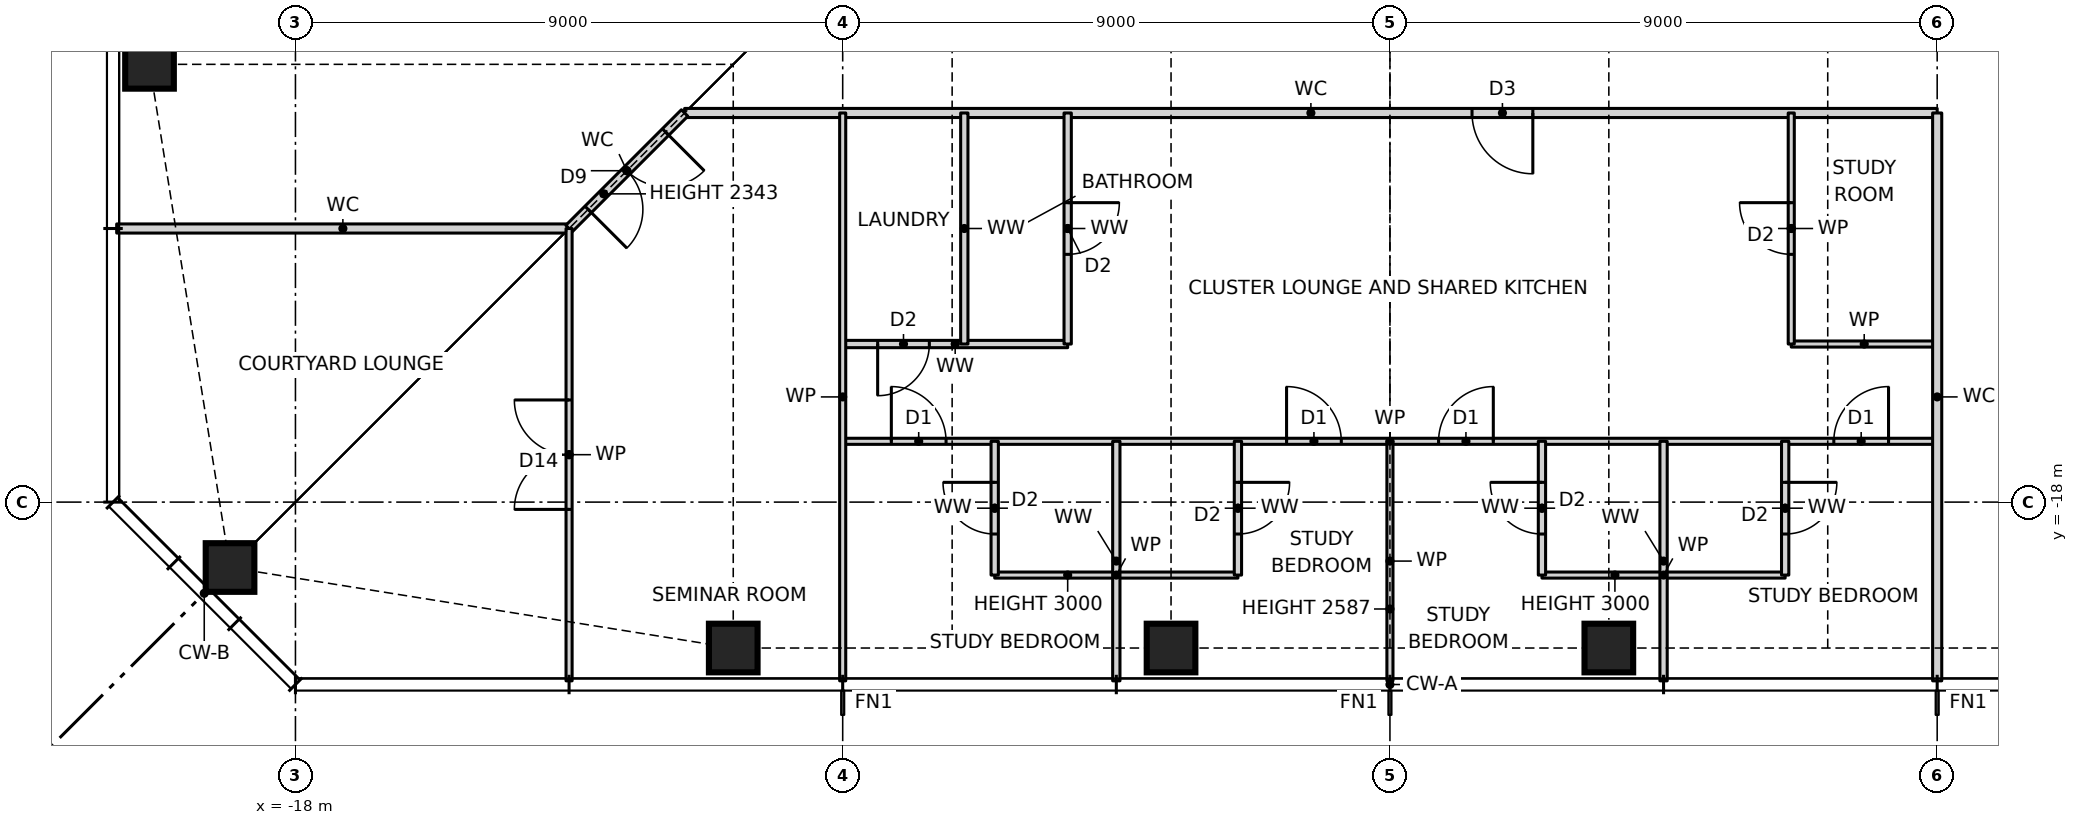
"""IFC4 building model, lengths in metres.
Left out: names, types, materials, properties, quantities, classifications, styles, units other than length and angle.
Written with IfcOpenShell. Run it as: python <this file> out.ifc"""

import sys

from ifc_helpers import new_model, si_unit, direction, frame, frame_2d, origin, origin_2d, place, context, subcontext, project, spatial, rectangle, hollow_rectangle, extrude, element, fill, save


model = new_model("IFC4")
c1 = context("Model", 3, precision=1e-05, world=origin(), true_north=direction((0.0, 1.0)))
c2 = subcontext(c1, "Body", "Model", "MODEL_VIEW")
j1 = project(units=[si_unit("LENGTHUNIT", "METRE"), si_unit("PLANEANGLEUNIT", "RADIAN")], contexts=[c1])
p1 = place(None, origin())
s1 = spatial("IfcSite", under=j1, at=p1, CompositionType="ELEMENT")
p2 = place(p1, origin())
s2 = spatial("IfcBuilding", under=s1, at=p2, CompositionType="ELEMENT")
p3 = place(p2, frame((0.0, 0.0, 101.5)))
s3 = spatial("IfcBuildingStorey", under=s2, at=p3, CompositionType="ELEMENT", Elevation=101.5)
for number, where, z_axis, x_axis in (
    (1, (-19.076, -19.076, 0.0), (0.0, 0.0, 1.0), (1.0, 0.0, 0.0)),
    (2, (-10.8, -20.4, 0.0), (0.0, 0.0, 1.0), (1.0, 0.0, 0.0)),
    (3, (-3.6, -20.4, 0.0), (0.0, 0.0, 1.0), (1.0, 0.0, 0.0)),
    (4, (3.6, -20.4, 0.0), (0.0, 0.0, 1.0), (1.0, 0.0, 0.0)),
    (5, (-20.4, -10.8, 0.0), (0.0, 0.0, 1.0), (1.0, 0.0, 0.0)),
):
    element("IfcColumn", number, at=place(p3, frame(where, z_axis=z_axis, x_axis=x_axis)), inside=s3, PredefinedType="COLUMN", context=c2, shape_type="SweptSolid", body=[
        extrude(hollow_rectangle(XDim=0.8, YDim=0.8, WallThickness=0.07, at=origin_2d()), origin(), (0.0, 0.0, 1.0), 3.5),
    ])
for number, where, z_axis, x_axis in (
    (6, (-6.5, -19.2, 0.0), (0.0, 0.0, 1.0), (1.0, 0.0, 0.0)),
    (7, (2.5, -19.2, 0.0), (0.0, 0.0, 1.0), (1.0, 0.0, 0.0)),
):
    element("IfcWall", number, at=place(p3, frame(where, z_axis=z_axis, x_axis=x_axis)), inside=s3, PredefinedType="PARTITIONING", context=c2, shape_type="SweptSolid", body=[
        extrude(rectangle(XDim=4.0, YDim=0.1, at=frame_2d((2.0, 0.0))), origin(), (0.0, 0.0, 1.0), 3.0),
    ])
p4 = place(p3, frame((-9.0, -17.0, 0.0), z_axis=(0.0, 0.0, 1.0), x_axis=(1.0, 0.0, 0.0)))
e8 = element("IfcWall", 8, at=p4, inside=s3, PredefinedType="PARTITIONING", context=c2, shape_type="SweptSolid", body=[
    extrude(rectangle(XDim=18.0, YDim=0.1, at=frame_2d((9.0, 0.0))), origin(), (0.0, 0.0, 1.0), 3.27),
])
p5 = place(p4, frame((0.8, 0.0, 0.0)))
e9 = element("IfcOpeningElement", 9, at=p5, cuts=e8, PredefinedType="OPENING", context=c2, shape_type="SweptSolid", body=[
    extrude(rectangle(XDim=0.9, YDim=2.1, at=frame_2d((0.45, 1.05))), frame((0.0, 0.06, 0.0), z_axis=(0.0, -1.0, 0.0), x_axis=(1.0, 0.0, 0.0)), (0.0, 0.0, 1.0), 0.12),
])
p6 = place(p4, frame((7.3, 0.0, 0.0)))
e10 = element("IfcOpeningElement", 10, at=p6, cuts=e8, PredefinedType="OPENING", context=c2, shape_type="SweptSolid", body=[
    extrude(rectangle(XDim=0.9, YDim=2.1, at=frame_2d((0.45, 1.05))), frame((0.0, 0.06, 0.0), z_axis=(0.0, -1.0, 0.0), x_axis=(1.0, 0.0, 0.0)), (0.0, 0.0, 1.0), 0.12),
])
p7 = place(p4, frame((9.8, 0.0, 0.0)))
e11 = element("IfcOpeningElement", 11, at=p7, cuts=e8, PredefinedType="OPENING", context=c2, shape_type="SweptSolid", body=[
    extrude(rectangle(XDim=0.9, YDim=2.1, at=frame_2d((0.45, 1.05))), frame((0.0, 0.06, 0.0), z_axis=(0.0, -1.0, 0.0), x_axis=(1.0, 0.0, 0.0)), (0.0, 0.0, 1.0), 0.12),
])
p8 = place(p4, frame((16.3, 0.0, 0.0)))
e12 = element("IfcOpeningElement", 12, at=p8, cuts=e8, PredefinedType="OPENING", context=c2, shape_type="SweptSolid", body=[
    extrude(rectangle(XDim=0.9, YDim=2.1, at=frame_2d((0.45, 1.05))), frame((0.0, 0.06, 0.0), z_axis=(0.0, -1.0, 0.0), x_axis=(1.0, 0.0, 0.0)), (0.0, 0.0, 1.0), 0.12),
])
p9 = place(p3, frame((-9.0, -15.4, 0.0), z_axis=(0.0, 0.0, 1.0), x_axis=(1.0, 0.0, 0.0)))
e13 = element("IfcWall", 13, at=p9, inside=s3, PredefinedType="PARTITIONING", context=c2, shape_type="SweptSolid", body=[
    extrude(rectangle(XDim=3.7, YDim=0.12, at=frame_2d((1.85, 0.0))), origin(), (0.0, 0.0, 1.0), 3.27),
])
p10 = place(p9, frame((0.575, 0.0, 0.0)))
e14 = element("IfcOpeningElement", 14, at=p10, cuts=e13, PredefinedType="OPENING", context=c2, shape_type="SweptSolid", body=[
    extrude(rectangle(XDim=0.85, YDim=2.1, at=frame_2d((0.425, 1.05))), frame((0.0, 0.07, 0.0), z_axis=(0.0, -1.0, 0.0), x_axis=(1.0, 0.0, 0.0)), (0.0, 0.0, 1.0), 0.14),
])
p11 = place(p3, frame((6.6, -15.4, 0.0), z_axis=(0.0, 0.0, 1.0), x_axis=(1.0, 0.0, 0.0)))
e15 = element("IfcWall", 15, at=p11, inside=s3, PredefinedType="PARTITIONING", context=c2, shape_type="SweptSolid", body=[
    extrude(rectangle(XDim=2.4, YDim=0.1, at=frame_2d((1.2, 0.0))), origin(), (0.0, 0.0, 1.0), 3.27),
])
p12 = place(p3, frame((-20.94, -13.5, 0.0), z_axis=(0.0, 0.0, 1.0), x_axis=(1.0, 0.0, 0.0)))
e16 = element("IfcWall", 16, at=p12, inside=s3, PredefinedType="PARTITIONING", context=c2, shape_type="SweptSolid", body=[
    extrude(rectangle(XDim=7.44, YDim=0.15, at=frame_2d((3.72, 0.0))), origin(), (0.0, 0.0, 1.0), 3.27),
])
p13 = place(p3, frame((-11.6, -11.6, 0.0), z_axis=(0.0, 0.0, 1.0), x_axis=(1.0, 0.0, 0.0)))
e17 = element("IfcWall", 17, at=p13, inside=s3, PredefinedType="PARTITIONING", context=c2, shape_type="SweptSolid", body=[
    extrude(rectangle(XDim=20.6, YDim=0.15, at=frame_2d((10.3, 0.0))), origin(), (0.0, 0.0, 1.0), 3.27),
])
p14 = place(p13, frame((12.95, 0.0, 0.0)))
e18 = element("IfcOpeningElement", 18, at=p14, cuts=e17, PredefinedType="OPENING", context=c2, shape_type="SweptSolid", body=[
    extrude(rectangle(XDim=1.0, YDim=2.1, at=frame_2d((0.5, 1.05))), frame((0.0, 0.085, 0.0), z_axis=(0.0, -1.0, 0.0), x_axis=(1.0, 0.0, 0.0)), (0.0, 0.0, 1.0), 0.17),
])
p15 = place(p3, frame((-13.5, -13.5, 0.0), z_axis=(0.0, 0.0, 1.0), x_axis=(0.707106781187, 0.707106781187, 0.0)))
e19 = element("IfcWall", 19, at=p15, inside=s3, PredefinedType="PARTITIONING", context=c2, shape_type="SweptSolid", body=[
    extrude(rectangle(XDim=2.687, YDim=0.15, at=frame_2d((1.343, 0.0))), origin(), (0.0, 0.0, 1.0), 2.343),
])
p16 = place(p15, frame((0.444, 0.0, 0.0)))
e20 = element("IfcOpeningElement", 20, at=p16, cuts=e19, PredefinedType="OPENING", context=c2, shape_type="SweptSolid", body=[
    extrude(rectangle(XDim=1.8, YDim=2.1, at=frame_2d((0.9, 1.05))), frame((0.0, 0.085, 0.0), z_axis=(0.0, -1.0, 0.0), x_axis=(1.0, 0.0, 0.0)), (0.0, 0.0, 1.0), 0.17),
])
p17 = place(p3, frame((9.0, -20.94, 0.0), z_axis=(0.0, 0.0, 1.0), x_axis=(0.0, 1.0, 0.0)))
e21 = element("IfcWall", 21, at=p17, inside=s3, PredefinedType="PARTITIONING", context=c2, shape_type="SweptSolid", body=[
    extrude(rectangle(XDim=9.34, YDim=0.15, at=frame_2d((4.67, 0.0))), origin(), (0.0, 0.0, 1.0), 3.27),
])
p18 = place(p3, frame((6.6, -15.4, 0.0), z_axis=(0.0, 0.0, 1.0), x_axis=(0.0, 1.0, 0.0)))
e22 = element("IfcWall", 22, at=p18, inside=s3, PredefinedType="PARTITIONING", context=c2, shape_type="SweptSolid", body=[
    extrude(rectangle(XDim=3.8, YDim=0.1, at=frame_2d((1.9, 0.0))), origin(), (0.0, 0.0, 1.0), 3.27),
])
p19 = place(p18, frame((1.475, 0.0, 0.0)))
e23 = element("IfcOpeningElement", 23, at=p19, cuts=e22, PredefinedType="OPENING", context=c2, shape_type="SweptSolid", body=[
    extrude(rectangle(XDim=0.85, YDim=2.1, at=frame_2d((0.425, 1.05))), frame((0.0, 0.06, 0.0), z_axis=(0.0, -1.0, 0.0), x_axis=(1.0, 0.0, 0.0)), (0.0, 0.0, 1.0), 0.12),
])
p20 = place(p3, frame((6.5, -19.2, 0.0), z_axis=(0.0, 0.0, 1.0), x_axis=(0.0, 1.0, 0.0)))
e24 = element("IfcWall", 24, at=p20, inside=s3, PredefinedType="PARTITIONING", context=c2, shape_type="SweptSolid", body=[
    extrude(rectangle(XDim=2.2, YDim=0.12, at=frame_2d((1.1, 0.0))), origin(), (0.0, 0.0, 1.0), 3.27),
])
p21 = place(p20, frame((0.675, 0.0, 0.0)))
e25 = element("IfcOpeningElement", 25, at=p21, cuts=e24, PredefinedType="OPENING", context=c2, shape_type="SweptSolid", body=[
    extrude(rectangle(XDim=0.85, YDim=2.1, at=frame_2d((0.425, 1.05))), frame((0.0, 0.07, 0.0), z_axis=(0.0, -1.0, 0.0), x_axis=(1.0, 0.0, 0.0)), (0.0, 0.0, 1.0), 0.14),
])
p22 = place(p3, frame((4.5, -20.94, 0.0), z_axis=(0.0, 0.0, 1.0), x_axis=(0.0, 1.0, 0.0)))
e26 = element("IfcWall", 26, at=p22, inside=s3, PredefinedType="PARTITIONING", context=c2, shape_type="SweptSolid", body=[
    extrude(rectangle(XDim=3.94, YDim=0.12, at=frame_2d((1.97, 0.0))), origin(), (0.0, 0.0, 1.0), 3.27),
])
p23 = place(p3, frame((2.5, -19.2, 0.0), z_axis=(0.0, 0.0, 1.0), x_axis=(0.0, 1.0, 0.0)))
e27 = element("IfcWall", 27, at=p23, inside=s3, PredefinedType="PARTITIONING", context=c2, shape_type="SweptSolid", body=[
    extrude(rectangle(XDim=2.2, YDim=0.12, at=frame_2d((1.1, 0.0))), origin(), (0.0, 0.0, 1.0), 3.27),
])
p24 = place(p23, frame((0.675, 0.0, 0.0)))
e28 = element("IfcOpeningElement", 28, at=p24, cuts=e27, PredefinedType="OPENING", context=c2, shape_type="SweptSolid", body=[
    extrude(rectangle(XDim=0.85, YDim=2.1, at=frame_2d((0.425, 1.05))), frame((0.0, 0.07, 0.0), z_axis=(0.0, -1.0, 0.0), x_axis=(1.0, 0.0, 0.0)), (0.0, 0.0, 1.0), 0.14),
])
p25 = place(p3, frame((0.0, -20.94, 0.0), z_axis=(0.0, 0.0, 1.0), x_axis=(0.0, 1.0, 0.0)))
e29 = element("IfcWall", 29, at=p25, inside=s3, PredefinedType="PARTITIONING", context=c2, shape_type="SweptSolid", body=[
    extrude(rectangle(XDim=3.94, YDim=0.1, at=frame_2d((1.97, 0.0))), origin(), (0.0, 0.0, 1.0), 2.587),
])
p26 = place(p3, frame((-2.5, -19.2, 0.0), z_axis=(0.0, 0.0, 1.0), x_axis=(0.0, 1.0, 0.0)))
e30 = element("IfcWall", 30, at=p26, inside=s3, PredefinedType="PARTITIONING", context=c2, shape_type="SweptSolid", body=[
    extrude(rectangle(XDim=2.2, YDim=0.12, at=frame_2d((1.1, 0.0))), origin(), (0.0, 0.0, 1.0), 3.27),
])
p27 = place(p26, frame((0.675, 0.0, 0.0)))
e31 = element("IfcOpeningElement", 31, at=p27, cuts=e30, PredefinedType="OPENING", context=c2, shape_type="SweptSolid", body=[
    extrude(rectangle(XDim=0.85, YDim=2.1, at=frame_2d((0.425, 1.05))), frame((0.0, 0.07, 0.0), z_axis=(0.0, -1.0, 0.0), x_axis=(1.0, 0.0, 0.0)), (0.0, 0.0, 1.0), 0.14),
])
p28 = place(p3, frame((-4.5, -20.94, 0.0), z_axis=(0.0, 0.0, 1.0), x_axis=(0.0, 1.0, 0.0)))
e32 = element("IfcWall", 32, at=p28, inside=s3, PredefinedType="PARTITIONING", context=c2, shape_type="SweptSolid", body=[
    extrude(rectangle(XDim=3.94, YDim=0.12, at=frame_2d((1.97, 0.0))), origin(), (0.0, 0.0, 1.0), 3.27),
])
p29 = place(p3, frame((-5.3, -15.4, 0.0), z_axis=(0.0, 0.0, 1.0), x_axis=(0.0, 1.0, 0.0)))
e33 = element("IfcWall", 33, at=p29, inside=s3, PredefinedType="PARTITIONING", context=c2, shape_type="SweptSolid", body=[
    extrude(rectangle(XDim=3.8, YDim=0.12, at=frame_2d((1.9, 0.0))), origin(), (0.0, 0.0, 1.0), 3.27),
])
p30 = place(p29, frame((1.475, 0.0, 0.0)))
e34 = element("IfcOpeningElement", 34, at=p30, cuts=e33, PredefinedType="OPENING", context=c2, shape_type="SweptSolid", body=[
    extrude(rectangle(XDim=0.85, YDim=2.1, at=frame_2d((0.425, 1.05))), frame((0.0, 0.07, 0.0), z_axis=(0.0, -1.0, 0.0), x_axis=(1.0, 0.0, 0.0)), (0.0, 0.0, 1.0), 0.14),
])
p31 = place(p3, frame((-6.5, -19.2, 0.0), z_axis=(0.0, 0.0, 1.0), x_axis=(0.0, 1.0, 0.0)))
e35 = element("IfcWall", 35, at=p31, inside=s3, PredefinedType="PARTITIONING", context=c2, shape_type="SweptSolid", body=[
    extrude(rectangle(XDim=2.2, YDim=0.12, at=frame_2d((1.1, 0.0))), origin(), (0.0, 0.0, 1.0), 3.27),
])
p32 = place(p31, frame((0.675, 0.0, 0.0)))
e36 = element("IfcOpeningElement", 36, at=p32, cuts=e35, PredefinedType="OPENING", context=c2, shape_type="SweptSolid", body=[
    extrude(rectangle(XDim=0.85, YDim=2.1, at=frame_2d((0.425, 1.05))), frame((0.0, 0.07, 0.0), z_axis=(0.0, -1.0, 0.0), x_axis=(1.0, 0.0, 0.0)), (0.0, 0.0, 1.0), 0.14),
])
p33 = place(p3, frame((-7.0, -15.4, 0.0), z_axis=(0.0, 0.0, 1.0), x_axis=(0.0, 1.0, 0.0)))
e37 = element("IfcWall", 37, at=p33, inside=s3, PredefinedType="PARTITIONING", context=c2, shape_type="SweptSolid", body=[
    extrude(rectangle(XDim=3.8, YDim=0.12, at=frame_2d((1.9, 0.0))), origin(), (0.0, 0.0, 1.0), 3.27),
])
p34 = place(p3, frame((-9.0, -20.94, 0.0), z_axis=(0.0, 0.0, 1.0), x_axis=(0.0, 1.0, 0.0)))
e38 = element("IfcWall", 38, at=p34, inside=s3, PredefinedType="PARTITIONING", context=c2, shape_type="SweptSolid", body=[
    extrude(rectangle(XDim=9.34, YDim=0.1, at=frame_2d((4.67, 0.0))), origin(), (0.0, 0.0, 1.0), 3.27),
])
p35 = place(p3, frame((-13.5, -20.94, 0.0), z_axis=(0.0, 0.0, 1.0), x_axis=(0.0, 1.0, 0.0)))
e39 = element("IfcWall", 39, at=p35, inside=s3, PredefinedType="PARTITIONING", context=c2, shape_type="SweptSolid", body=[
    extrude(rectangle(XDim=7.44, YDim=0.1, at=frame_2d((3.72, 0.0))), origin(), (0.0, 0.0, 1.0), 3.27),
])
p36 = place(p35, frame((2.82, 0.0, 0.0)))
e40 = element("IfcOpeningElement", 40, at=p36, cuts=e39, PredefinedType="OPENING", context=c2, shape_type="SweptSolid", body=[
    extrude(rectangle(XDim=1.8, YDim=2.1, at=frame_2d((0.9, 1.05))), frame((0.0, 0.06, 0.0), z_axis=(0.0, -1.0, 0.0), x_axis=(1.0, 0.0, 0.0)), (0.0, 0.0, 1.0), 0.12),
])
p37 = place(p16, frame((1.8, 0.0, 0.0), z_axis=(0.0, 0.0, 1.0), x_axis=(-1.0, 0.0, 0.0)))
e41 = element("IfcDoor", 41, at=p37, inside=s3, OperationType="DOUBLE_DOOR_SINGLE_SWING", PredefinedType="DOOR", context=c2, shape_type="SweptSolid", body=[
    extrude(rectangle(XDim=1.8, YDim=2.1, at=frame_2d((0.9, 1.05))), frame((0.0, 0.025, 0.0), z_axis=(0.0, -1.0, 0.0), x_axis=(1.0, 0.0, 0.0)), (0.0, 0.0, 1.0), 0.05),
])
fill(e20, e41)
p38 = place(p32, origin())
e42 = element("IfcDoor", 42, at=p38, inside=s3, OperationType="SINGLE_SWING_RIGHT", PredefinedType="DOOR", context=c2, shape_type="SweptSolid", body=[
    extrude(rectangle(XDim=0.85, YDim=2.1, at=frame_2d((0.425, 1.05))), frame((0.0, 0.025, 0.0), z_axis=(0.0, -1.0, 0.0), x_axis=(1.0, 0.0, 0.0)), (0.0, 0.0, 1.0), 0.05),
])
fill(e36, e42)
p39 = place(p5, origin())
e43 = element("IfcDoor", 43, at=p39, inside=s3, OperationType="SINGLE_SWING_LEFT", PredefinedType="DOOR", context=c2, shape_type="SweptSolid", body=[
    extrude(rectangle(XDim=0.9, YDim=2.1, at=frame_2d((0.45, 1.05))), frame((0.0, 0.025, 0.0), z_axis=(0.0, -1.0, 0.0), x_axis=(1.0, 0.0, 0.0)), (0.0, 0.0, 1.0), 0.05),
])
fill(e9, e43)
p40 = place(p27, frame((0.85, 0.0, 0.0), z_axis=(0.0, 0.0, 1.0), x_axis=(-1.0, 0.0, 0.0)))
e44 = element("IfcDoor", 44, at=p40, inside=s3, OperationType="SINGLE_SWING_LEFT", PredefinedType="DOOR", context=c2, shape_type="SweptSolid", body=[
    extrude(rectangle(XDim=0.85, YDim=2.1, at=frame_2d((0.425, 1.05))), frame((0.0, 0.025, 0.0), z_axis=(0.0, -1.0, 0.0), x_axis=(1.0, 0.0, 0.0)), (0.0, 0.0, 1.0), 0.05),
])
fill(e31, e44)
p41 = place(p6, origin())
e45 = element("IfcDoor", 45, at=p41, inside=s3, OperationType="SINGLE_SWING_LEFT", PredefinedType="DOOR", context=c2, shape_type="SweptSolid", body=[
    extrude(rectangle(XDim=0.9, YDim=2.1, at=frame_2d((0.45, 1.05))), frame((0.0, 0.025, 0.0), z_axis=(0.0, -1.0, 0.0), x_axis=(1.0, 0.0, 0.0)), (0.0, 0.0, 1.0), 0.05),
])
fill(e10, e45)
p42 = place(p24, origin())
e46 = element("IfcDoor", 46, at=p42, inside=s3, OperationType="SINGLE_SWING_RIGHT", PredefinedType="DOOR", context=c2, shape_type="SweptSolid", body=[
    extrude(rectangle(XDim=0.85, YDim=2.1, at=frame_2d((0.425, 1.05))), frame((0.0, 0.025, 0.0), z_axis=(0.0, -1.0, 0.0), x_axis=(1.0, 0.0, 0.0)), (0.0, 0.0, 1.0), 0.05),
])
fill(e28, e46)
p43 = place(p7, origin())
e47 = element("IfcDoor", 47, at=p43, inside=s3, OperationType="SINGLE_SWING_RIGHT", PredefinedType="DOOR", context=c2, shape_type="SweptSolid", body=[
    extrude(rectangle(XDim=0.9, YDim=2.1, at=frame_2d((0.45, 1.05))), frame((0.0, 0.025, 0.0), z_axis=(0.0, -1.0, 0.0), x_axis=(1.0, 0.0, 0.0)), (0.0, 0.0, 1.0), 0.05),
])
fill(e11, e47)
p44 = place(p21, frame((0.85, 0.0, 0.0), z_axis=(0.0, 0.0, 1.0), x_axis=(-1.0, 0.0, 0.0)))
e48 = element("IfcDoor", 48, at=p44, inside=s3, OperationType="SINGLE_SWING_LEFT", PredefinedType="DOOR", context=c2, shape_type="SweptSolid", body=[
    extrude(rectangle(XDim=0.85, YDim=2.1, at=frame_2d((0.425, 1.05))), frame((0.0, 0.025, 0.0), z_axis=(0.0, -1.0, 0.0), x_axis=(1.0, 0.0, 0.0)), (0.0, 0.0, 1.0), 0.05),
])
fill(e25, e48)
p45 = place(p8, origin())
e49 = element("IfcDoor", 49, at=p45, inside=s3, OperationType="SINGLE_SWING_RIGHT", PredefinedType="DOOR", context=c2, shape_type="SweptSolid", body=[
    extrude(rectangle(XDim=0.9, YDim=2.1, at=frame_2d((0.45, 1.05))), frame((0.0, 0.025, 0.0), z_axis=(0.0, -1.0, 0.0), x_axis=(1.0, 0.0, 0.0)), (0.0, 0.0, 1.0), 0.05),
])
fill(e12, e49)
p46 = place(p14, frame((1.0, 0.0, 0.0), z_axis=(0.0, 0.0, 1.0), x_axis=(-1.0, 0.0, 0.0)))
e50 = element("IfcDoor", 50, at=p46, inside=s3, OperationType="SINGLE_SWING_LEFT", PredefinedType="DOOR", context=c2, shape_type="SweptSolid", body=[
    extrude(rectangle(XDim=1.0, YDim=2.1, at=frame_2d((0.5, 1.05))), frame((0.0, 0.025, 0.0), z_axis=(0.0, -1.0, 0.0), x_axis=(1.0, 0.0, 0.0)), (0.0, 0.0, 1.0), 0.05),
])
fill(e18, e50)
p47 = place(p10, frame((0.85, 0.0, 0.0), z_axis=(0.0, 0.0, 1.0), x_axis=(-1.0, 0.0, 0.0)))
e51 = element("IfcDoor", 51, at=p47, inside=s3, OperationType="SINGLE_SWING_RIGHT", PredefinedType="DOOR", context=c2, shape_type="SweptSolid", body=[
    extrude(rectangle(XDim=0.85, YDim=2.1, at=frame_2d((0.425, 1.05))), frame((0.0, 0.025, 0.0), z_axis=(0.0, -1.0, 0.0), x_axis=(1.0, 0.0, 0.0)), (0.0, 0.0, 1.0), 0.05),
])
fill(e14, e51)
p48 = place(p30, frame((0.85, 0.0, 0.0), z_axis=(0.0, 0.0, 1.0), x_axis=(-1.0, 0.0, 0.0)))
e52 = element("IfcDoor", 52, at=p48, inside=s3, OperationType="SINGLE_SWING_LEFT", PredefinedType="DOOR", context=c2, shape_type="SweptSolid", body=[
    extrude(rectangle(XDim=0.85, YDim=2.1, at=frame_2d((0.425, 1.05))), frame((0.0, 0.025, 0.0), z_axis=(0.0, -1.0, 0.0), x_axis=(1.0, 0.0, 0.0)), (0.0, 0.0, 1.0), 0.05),
])
fill(e34, e52)
p49 = place(p19, origin())
e53 = element("IfcDoor", 53, at=p49, inside=s3, OperationType="SINGLE_SWING_RIGHT", PredefinedType="DOOR", context=c2, shape_type="SweptSolid", body=[
    extrude(rectangle(XDim=0.85, YDim=2.1, at=frame_2d((0.425, 1.05))), frame((0.0, 0.025, 0.0), z_axis=(0.0, -1.0, 0.0), x_axis=(1.0, 0.0, 0.0)), (0.0, 0.0, 1.0), 0.05),
])
fill(e23, e53)
p50 = place(p36, origin())
e54 = element("IfcDoor", 54, at=p50, inside=s3, OperationType="DOUBLE_DOOR_SINGLE_SWING", PredefinedType="DOOR", context=c2, shape_type="SweptSolid", body=[
    extrude(rectangle(XDim=1.8, YDim=2.1, at=frame_2d((0.9, 1.05))), frame((0.0, 0.025, 0.0), z_axis=(0.0, -1.0, 0.0), x_axis=(1.0, 0.0, 0.0)), (0.0, 0.0, 1.0), 0.05),
])
fill(e40, e54)
save(model, sys.argv[1])
